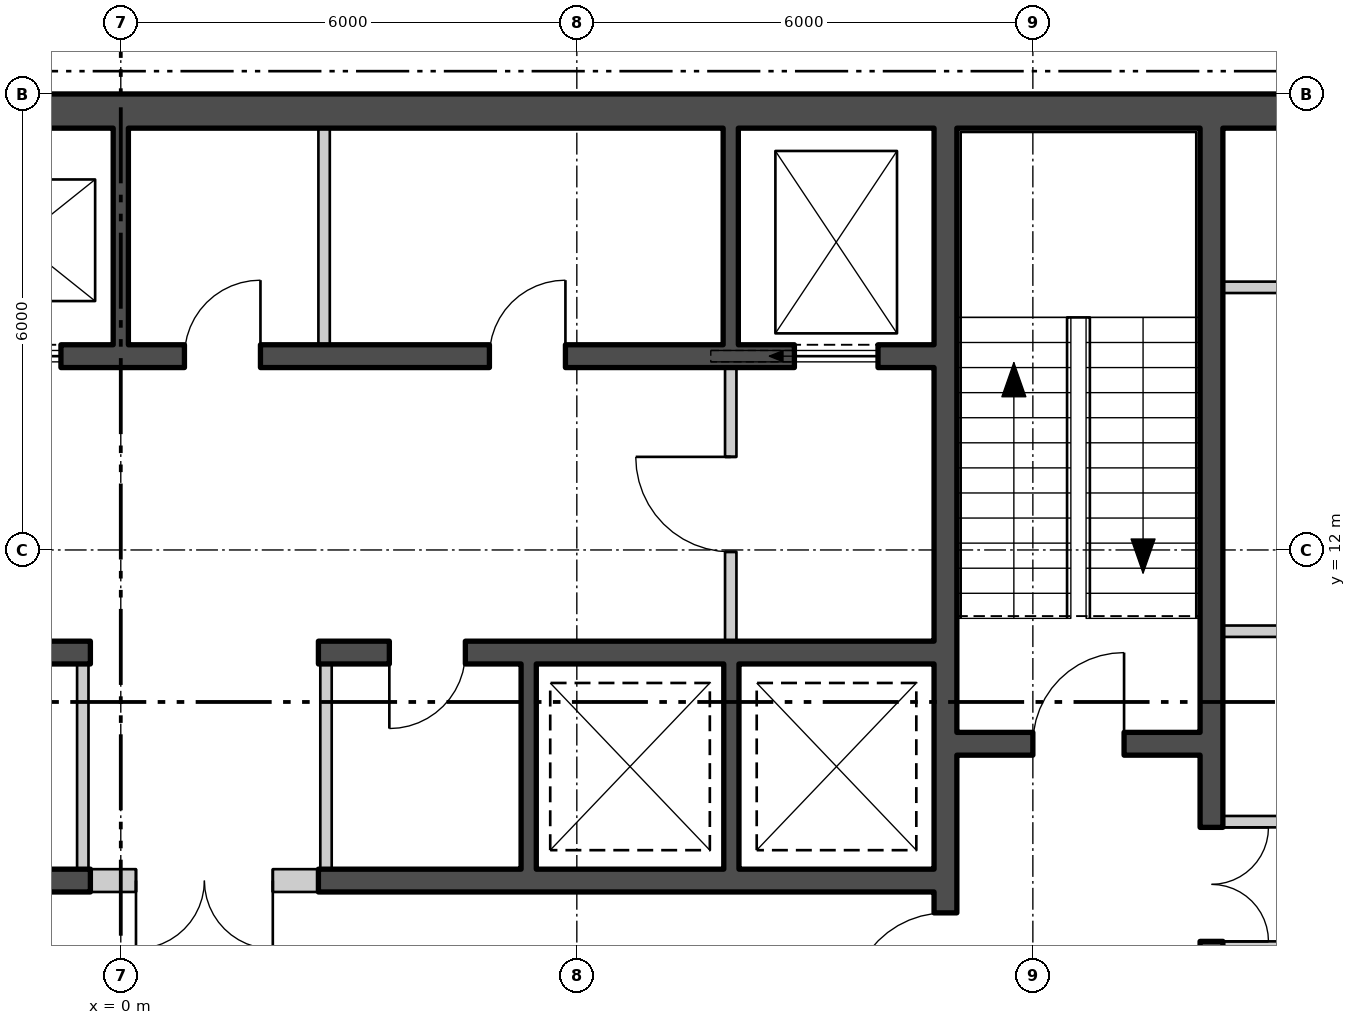
"""IFC4 building model, lengths in metres.
Left out: names, types, materials, properties, quantities, classifications, styles, units other than length and angle.
Written with IfcOpenShell. Run it as: python <this file> out.ifc"""

import sys

from ifc_helpers import new_model, si_unit, direction, frame, frame_2d, origin, place, context, subcontext, project, spatial, polyline, rectangle, outline, extrude, element, fill, save


model = new_model("IFC4")
c1 = context("Model", 3, precision=1e-05, world=origin(), true_north=direction((0.0, 1.0)))
c2 = subcontext(c1, "Body", "Model", "MODEL_VIEW")
j1 = project(units=[si_unit("LENGTHUNIT", "METRE"), si_unit("PLANEANGLEUNIT", "RADIAN")], contexts=[c1])
p1 = place(None, origin())
s1 = spatial("IfcSite", under=j1, at=p1, CompositionType="ELEMENT")
p2 = place(p1, origin())
s2 = spatial("IfcBuilding", under=s1, at=p2, CompositionType="ELEMENT")
p3 = place(p2, frame((0.0, 0.0, 204.3)))
s3 = spatial("IfcBuildingStorey", under=s2, at=p3, CompositionType="ELEMENT", Elevation=204.3)
p4 = place(p3, frame((3.515, -25.726, -0.18), z_axis=(0.0, 0.0, 1.0), x_axis=(0.499999764979, 0.866025539474, 0.0)))
e1 = element("IfcWall", 1, at=p4, inside=s3, PredefinedType="SOLIDWALL", context=c2, shape_type="SweptSolid", body=[
    extrude(outline(polyline([(-0.13, -0.225), (45.87, -0.225), (45.61, 0.225), (0.13, 0.225), (-0.13, -0.225)])), origin(), (0.0, 0.0, 1.0), 3.68),
])
p5 = place(p4, frame((1.424, 0.0, 1.08)))
e2 = element("IfcOpeningElement", 2, at=p5, cuts=e1, PredefinedType="OPENING", context=c2, shape_type="SweptSolid", body=[
    extrude(rectangle(XDim=2.4, YDim=2.0, at=frame_2d((1.2, 1.0))), frame((0.0, 0.235, 0.0), z_axis=(0.0, -1.0, 0.0), x_axis=(1.0, 0.0, 0.0)), (0.0, 0.0, 1.0), 0.47),
])
p6 = place(p4, frame((5.893, 0.0, 1.08)))
e3 = element("IfcOpeningElement", 3, at=p6, cuts=e1, PredefinedType="OPENING", context=c2, shape_type="SweptSolid", body=[
    extrude(rectangle(XDim=2.4, YDim=2.0, at=frame_2d((1.2, 1.0))), frame((0.0, 0.235, 0.0), z_axis=(0.0, -1.0, 0.0), x_axis=(1.0, 0.0, 0.0)), (0.0, 0.0, 1.0), 0.47),
])
p7 = place(p4, frame((10.401, 0.0, 1.08)))
e4 = element("IfcOpeningElement", 4, at=p7, cuts=e1, PredefinedType="OPENING", context=c2, shape_type="SweptSolid", body=[
    extrude(rectangle(XDim=2.4, YDim=2.0, at=frame_2d((1.2, 1.0))), frame((0.0, 0.235, 0.0), z_axis=(0.0, -1.0, 0.0), x_axis=(1.0, 0.0, 0.0)), (0.0, 0.0, 1.0), 0.47),
])
p8 = place(p4, frame((14.909, 0.0, 1.08)))
e5 = element("IfcOpeningElement", 5, at=p8, cuts=e1, PredefinedType="OPENING", context=c2, shape_type="SweptSolid", body=[
    extrude(rectangle(XDim=2.4, YDim=2.0, at=frame_2d((1.2, 1.0))), frame((0.0, 0.235, 0.0), z_axis=(0.0, -1.0, 0.0), x_axis=(1.0, 0.0, 0.0)), (0.0, 0.0, 1.0), 0.47),
])
p9 = place(p4, frame((19.416, 0.0, 1.08)))
e6 = element("IfcOpeningElement", 6, at=p9, cuts=e1, PredefinedType="OPENING", context=c2, shape_type="SweptSolid", body=[
    extrude(rectangle(XDim=2.4, YDim=2.0, at=frame_2d((1.2, 1.0))), frame((0.0, 0.235, 0.0), z_axis=(0.0, -1.0, 0.0), x_axis=(1.0, 0.0, 0.0)), (0.0, 0.0, 1.0), 0.47),
])
p10 = place(p4, frame((23.924, 0.0, 1.08)))
e7 = element("IfcOpeningElement", 7, at=p10, cuts=e1, PredefinedType="OPENING", context=c2, shape_type="SweptSolid", body=[
    extrude(rectangle(XDim=2.4, YDim=2.0, at=frame_2d((1.2, 1.0))), frame((0.0, 0.235, 0.0), z_axis=(0.0, -1.0, 0.0), x_axis=(1.0, 0.0, 0.0)), (0.0, 0.0, 1.0), 0.47),
])
p11 = place(p4, frame((28.431, 0.0, 1.08)))
e8 = element("IfcOpeningElement", 8, at=p11, cuts=e1, PredefinedType="OPENING", context=c2, shape_type="SweptSolid", body=[
    extrude(rectangle(XDim=2.4, YDim=2.0, at=frame_2d((1.2, 1.0))), frame((0.0, 0.235, 0.0), z_axis=(0.0, -1.0, 0.0), x_axis=(1.0, 0.0, 0.0)), (0.0, 0.0, 1.0), 0.47),
])
p12 = place(p4, frame((32.939, 0.0, 1.08)))
e9 = element("IfcOpeningElement", 9, at=p12, cuts=e1, PredefinedType="OPENING", context=c2, shape_type="SweptSolid", body=[
    extrude(rectangle(XDim=2.4, YDim=2.0, at=frame_2d((1.2, 1.0))), frame((0.0, 0.235, 0.0), z_axis=(0.0, -1.0, 0.0), x_axis=(1.0, 0.0, 0.0)), (0.0, 0.0, 1.0), 0.47),
])
p13 = place(p4, frame((37.447, 0.0, 1.08)))
e10 = element("IfcOpeningElement", 10, at=p13, cuts=e1, PredefinedType="OPENING", context=c2, shape_type="SweptSolid", body=[
    extrude(rectangle(XDim=2.4, YDim=2.0, at=frame_2d((1.2, 1.0))), frame((0.0, 0.235, 0.0), z_axis=(0.0, -1.0, 0.0), x_axis=(1.0, 0.0, 0.0)), (0.0, 0.0, 1.0), 0.47),
])
p14 = place(p4, frame((41.916, 0.0, 1.08)))
e11 = element("IfcOpeningElement", 11, at=p14, cuts=e1, PredefinedType="OPENING", context=c2, shape_type="SweptSolid", body=[
    extrude(rectangle(XDim=2.4, YDim=2.0, at=frame_2d((1.2, 1.0))), frame((0.0, 0.235, 0.0), z_axis=(0.0, -1.0, 0.0), x_axis=(1.0, 0.0, 0.0)), (0.0, 0.0, 1.0), 0.47),
])
p15 = place(p3, frame((-16.2, 17.775, 0.0), z_axis=(0.0, 0.0, 1.0), x_axis=(1.0, 0.0, 0.0)))
e12 = element("IfcWall", 12, at=p15, inside=s3, PredefinedType="SHEAR", context=c2, shape_type="SweptSolid", body=[
    extrude(rectangle(XDim=32.4, YDim=0.45, at=frame_2d((16.2, 0.0))), origin(), (0.0, 0.0, 1.0), 3.7),
])
p16 = place(p3, frame((10.85, 2.45, 0.0), z_axis=(0.0, 0.0, 1.0), x_axis=(0.0, 1.0, 0.0)))
e13 = element("IfcWall", 13, at=p16, inside=s3, PredefinedType="SHEAR", context=c2, shape_type="SweptSolid", body=[
    extrude(rectangle(XDim=15.1, YDim=0.3, at=frame_2d((7.55, 0.0))), origin(), (0.0, 0.0, 1.0), 3.7),
])
p17 = place(p16, frame((3.525, 0.0, 0.0)))
e14 = element("IfcOpeningElement", 14, at=p17, cuts=e13, PredefinedType="OPENING", context=c2, shape_type="SweptSolid", body=[
    extrude(rectangle(XDim=1.25, YDim=2.1, at=frame_2d((0.625, 1.05))), frame((0.0, 0.16, 0.0), z_axis=(0.0, -1.0, 0.0), x_axis=(1.0, 0.0, 0.0)), (0.0, 0.0, 1.0), 0.32),
])
p18 = place(p16, frame((1.15, 0.0, 0.0)))
e15 = element("IfcOpeningElement", 15, at=p18, cuts=e13, PredefinedType="OPENING", context=c2, shape_type="SweptSolid", body=[
    extrude(rectangle(XDim=1.0, YDim=2.1, at=frame_2d((0.5, 1.05))), frame((0.0, 0.16, 0.0), z_axis=(0.0, -1.0, 0.0), x_axis=(1.0, 0.0, 0.0)), (0.0, 0.0, 1.0), 0.32),
])
p19 = place(p3, frame((14.35, 2.45, 0.0), z_axis=(0.0, 0.0, 1.0), x_axis=(0.0, 1.0, 0.0)))
e16 = element("IfcWall", 16, at=p19, inside=s3, PredefinedType="SHEAR", context=c2, shape_type="SweptSolid", body=[
    extrude(rectangle(XDim=15.1, YDim=0.3, at=frame_2d((7.55, 0.0))), origin(), (0.0, 0.0, 1.0), 3.7),
])
p20 = place(p19, frame((4.4, 0.0, 0.0)))
e17 = element("IfcOpeningElement", 17, at=p20, cuts=e16, PredefinedType="OPENING", context=c2, shape_type="SweptSolid", body=[
    extrude(rectangle(XDim=1.5, YDim=2.1, at=frame_2d((0.75, 1.05))), frame((0.0, 0.16, 0.0), z_axis=(0.0, -1.0, 0.0), x_axis=(1.0, 0.0, 0.0)), (0.0, 0.0, 1.0), 0.32),
])
p21 = place(p3, frame((11.0, 9.45, 0.0), z_axis=(0.0, 0.0, 1.0), x_axis=(1.0, 0.0, 0.0)))
e18 = element("IfcWall", 18, at=p21, inside=s3, PredefinedType="SHEAR", context=c2, shape_type="SweptSolid", body=[
    extrude(rectangle(XDim=3.2, YDim=0.3, at=frame_2d((1.6, 0.0))), origin(), (0.0, 0.0, 1.0), 3.7),
])
p22 = place(p21, frame((1.0, 0.0, 0.0)))
e19 = element("IfcOpeningElement", 19, at=p22, cuts=e18, PredefinedType="OPENING", context=c2, shape_type="SweptSolid", body=[
    extrude(rectangle(XDim=1.2, YDim=2.1, at=frame_2d((0.6, 1.05))), frame((0.0, 0.16, 0.0), z_axis=(0.0, -1.0, 0.0), x_axis=(1.0, 0.0, 0.0)), (0.0, 0.0, 1.0), 0.32),
])
p23 = place(p3, frame((-10.7, 14.55, 0.0), z_axis=(0.0, 0.0, 1.0), x_axis=(1.0, 0.0, 0.0)))
e20 = element("IfcWall", 20, at=p23, inside=s3, PredefinedType="SHEAR", context=c2, shape_type="SweptSolid", body=[
    extrude(rectangle(XDim=21.4, YDim=0.3, at=frame_2d((10.7, 0.0))), origin(), (0.0, 0.0, 1.0), 3.7),
])
p24 = place(p23, frame((0.738, 0.0, 0.0)))
e21 = element("IfcOpeningElement", 21, at=p24, cuts=e20, PredefinedType="OPENING", context=c2, shape_type="SweptSolid", body=[
    extrude(rectangle(XDim=1.1, YDim=2.1, at=frame_2d((0.55, 1.05))), frame((0.0, 0.16, 0.0), z_axis=(0.0, -1.0, 0.0), x_axis=(1.0, 0.0, 0.0)), (0.0, 0.0, 1.0), 0.32),
])
p25 = place(p23, frame((3.462, 0.0, 0.0)))
e22 = element("IfcOpeningElement", 22, at=p25, cuts=e20, PredefinedType="OPENING", context=c2, shape_type="SweptSolid", body=[
    extrude(rectangle(XDim=1.1, YDim=2.1, at=frame_2d((0.55, 1.05))), frame((0.0, 0.16, 0.0), z_axis=(0.0, -1.0, 0.0), x_axis=(1.0, 0.0, 0.0)), (0.0, 0.0, 1.0), 0.32),
])
p26 = place(p23, frame((6.138, 0.0, 0.0)))
e23 = element("IfcOpeningElement", 23, at=p26, cuts=e20, PredefinedType="OPENING", context=c2, shape_type="SweptSolid", body=[
    extrude(rectangle(XDim=1.1, YDim=2.1, at=frame_2d((0.55, 1.05))), frame((0.0, 0.16, 0.0), z_axis=(0.0, -1.0, 0.0), x_axis=(1.0, 0.0, 0.0)), (0.0, 0.0, 1.0), 0.32),
])
p27 = place(p23, frame((8.812, 0.0, 0.0)))
e24 = element("IfcOpeningElement", 24, at=p27, cuts=e20, PredefinedType="OPENING", context=c2, shape_type="SweptSolid", body=[
    extrude(rectangle(XDim=1.1, YDim=2.1, at=frame_2d((0.55, 1.05))), frame((0.0, 0.16, 0.0), z_axis=(0.0, -1.0, 0.0), x_axis=(1.0, 0.0, 0.0)), (0.0, 0.0, 1.0), 0.32),
])
p28 = place(p23, frame((19.562, 0.0, 0.0)))
e25 = element("IfcOpeningElement", 25, at=p28, cuts=e20, PredefinedType="OPENING", context=c2, shape_type="SweptSolid", body=[
    extrude(rectangle(XDim=1.1, YDim=2.1, at=frame_2d((0.55, 1.05))), frame((0.0, 0.16, 0.0), z_axis=(0.0, -1.0, 0.0), x_axis=(1.0, 0.0, 0.0)), (0.0, 0.0, 1.0), 0.32),
])
p29 = place(p23, frame((11.537, 0.0, 0.0)))
e26 = element("IfcOpeningElement", 26, at=p29, cuts=e20, PredefinedType="OPENING", context=c2, shape_type="SweptSolid", body=[
    extrude(rectangle(XDim=1.0, YDim=2.1, at=frame_2d((0.5, 1.05))), frame((0.0, 0.16, 0.0), z_axis=(0.0, -1.0, 0.0), x_axis=(1.0, 0.0, 0.0)), (0.0, 0.0, 1.0), 0.32),
])
p30 = place(p23, frame((15.55, 0.0, 0.0)))
e27 = element("IfcOpeningElement", 27, at=p30, cuts=e20, PredefinedType="OPENING", context=c2, shape_type="SweptSolid", body=[
    extrude(rectangle(XDim=1.0, YDim=2.1, at=frame_2d((0.5, 1.05))), frame((0.0, 0.16, 0.0), z_axis=(0.0, -1.0, 0.0), x_axis=(1.0, 0.0, 0.0)), (0.0, 0.0, 1.0), 0.32),
])
p31 = place(p3, frame((-10.7, 10.65, 0.0), z_axis=(0.0, 0.0, 1.0), x_axis=(1.0, 0.0, 0.0)))
e28 = element("IfcWall", 28, at=p31, inside=s3, PredefinedType="SHEAR", context=c2, shape_type="SweptSolid", body=[
    extrude(rectangle(XDim=10.3, YDim=0.3, at=frame_2d((5.15, 0.0))), origin(), (0.0, 0.0, 1.0), 3.7),
])
p32 = place(p31, frame((0.675, 0.0, 0.0)))
e29 = element("IfcOpeningElement", 29, at=p32, cuts=e28, PredefinedType="OPENING", context=c2, shape_type="SweptSolid", body=[
    extrude(rectangle(XDim=1.1, YDim=2.1, at=frame_2d((0.55, 1.05))), frame((0.0, 0.16, 0.0), z_axis=(0.0, -1.0, 0.0), x_axis=(1.0, 0.0, 0.0)), (0.0, 0.0, 1.0), 0.32),
])
p33 = place(p31, frame((3.275, 0.0, 0.0)))
e30 = element("IfcOpeningElement", 30, at=p33, cuts=e28, PredefinedType="OPENING", context=c2, shape_type="SweptSolid", body=[
    extrude(rectangle(XDim=1.1, YDim=2.1, at=frame_2d((0.55, 1.05))), frame((0.0, 0.16, 0.0), z_axis=(0.0, -1.0, 0.0), x_axis=(1.0, 0.0, 0.0)), (0.0, 0.0, 1.0), 0.32),
])
p34 = place(p31, frame((5.825, 0.0, 0.0)))
e31 = element("IfcOpeningElement", 31, at=p34, cuts=e28, PredefinedType="OPENING", context=c2, shape_type="SweptSolid", body=[
    extrude(rectangle(XDim=1.1, YDim=2.1, at=frame_2d((0.55, 1.05))), frame((0.0, 0.16, 0.0), z_axis=(0.0, -1.0, 0.0), x_axis=(1.0, 0.0, 0.0)), (0.0, 0.0, 1.0), 0.32),
])
p35 = place(p31, frame((8.425, 0.0, 0.0)))
e32 = element("IfcOpeningElement", 32, at=p35, cuts=e28, PredefinedType="OPENING", context=c2, shape_type="SweptSolid", body=[
    extrude(rectangle(XDim=1.0, YDim=2.1, at=frame_2d((0.5, 1.05))), frame((0.0, 0.16, 0.0), z_axis=(0.0, -1.0, 0.0), x_axis=(1.0, 0.0, 0.0)), (0.0, 0.0, 1.0), 0.32),
])
p36 = place(p3, frame((-10.7, 7.65, 0.0), z_axis=(0.0, 0.0, 1.0), x_axis=(1.0, 0.0, 0.0)))
e33 = element("IfcWall", 33, at=p36, inside=s3, PredefinedType="SHEAR", context=c2, shape_type="SweptSolid", body=[
    extrude(rectangle(XDim=10.3, YDim=0.3, at=frame_2d((5.15, 0.0))), origin(), (0.0, 0.0, 1.0), 3.7),
])
p37 = place(p3, frame((2.6, 10.65, 0.0), z_axis=(0.0, 0.0, 1.0), x_axis=(1.0, 0.0, 0.0)))
e34 = element("IfcWall", 34, at=p37, inside=s3, PredefinedType="SHEAR", context=c2, shape_type="SweptSolid", body=[
    extrude(rectangle(XDim=8.1, YDim=0.3, at=frame_2d((4.05, 0.0))), origin(), (0.0, 0.0, 1.0), 3.7),
])
p38 = place(p37, frame((0.933, 0.0, 0.0)))
e35 = element("IfcOpeningElement", 35, at=p38, cuts=e34, PredefinedType="OPENING", context=c2, shape_type="SweptSolid", body=[
    extrude(rectangle(XDim=1.0, YDim=2.1, at=frame_2d((0.5, 1.05))), frame((0.0, 0.16, 0.0), z_axis=(0.0, -1.0, 0.0), x_axis=(1.0, 0.0, 0.0)), (0.0, 0.0, 1.0), 0.32),
])
p39 = place(p3, frame((2.6, 7.65, 0.0), z_axis=(0.0, 0.0, 1.0), x_axis=(1.0, 0.0, 0.0)))
e36 = element("IfcWall", 36, at=p39, inside=s3, PredefinedType="SHEAR", context=c2, shape_type="SweptSolid", body=[
    extrude(rectangle(XDim=8.1, YDim=0.3, at=frame_2d((4.05, 0.0))), origin(), (0.0, 0.0, 1.0), 3.7),
])
p40 = place(p3, frame((0.0, 14.7, 0.0), z_axis=(0.0, 0.0, 1.0), x_axis=(0.0, 1.0, 0.0)))
e37 = element("IfcWall", 37, at=p40, inside=s3, PredefinedType="SHEAR", context=c2, shape_type="SweptSolid", body=[
    extrude(rectangle(XDim=2.85, YDim=0.2, at=frame_2d((1.425, 0.0))), origin(), (0.0, 0.0, 1.0), 3.7),
])
p41 = place(p3, frame((2.675, 14.7, 0.0), z_axis=(0.0, 0.0, 1.0), x_axis=(0.0, 1.0, 0.0)))
e38 = element("IfcWall", 38, at=p41, inside=s3, PredefinedType="PARTITIONING", context=c2, shape_type="SweptSolid", body=[
    extrude(rectangle(XDim=2.85, YDim=0.15, at=frame_2d((1.425, 0.0))), origin(), (0.0, 0.0, 1.0), 3.7),
])
p42 = place(p3, frame((8.025, 14.7, 0.0), z_axis=(0.0, 0.0, 1.0), x_axis=(0.0, 1.0, 0.0)))
e39 = element("IfcWall", 39, at=p42, inside=s3, PredefinedType="SHEAR", context=c2, shape_type="SweptSolid", body=[
    extrude(rectangle(XDim=2.85, YDim=0.2, at=frame_2d((1.425, 0.0))), origin(), (0.0, 0.0, 1.0), 3.7),
])
for number, where, z_axis, x_axis in (
    (40, (-0.5, 7.8, 0.0), (0.0, 0.0, 1.0), (0.0, 1.0, 0.0)),
    (41, (2.7, 7.8, 0.0), (0.0, 0.0, 1.0), (0.0, 1.0, 0.0)),
):
    element("IfcWall", number, at=place(p3, frame(where, z_axis=z_axis, x_axis=x_axis)), inside=s3, PredefinedType="PARTITIONING", context=c2, shape_type="SweptSolid", body=[
        extrude(rectangle(XDim=2.7, YDim=0.15, at=frame_2d((1.35, 0.0))), origin(), (0.0, 0.0, 1.0), 3.7),
    ])
for number, where, z_axis, x_axis in (
    (42, (5.367, 7.8, 0.0), (0.0, 0.0, 1.0), (0.0, 1.0, 0.0)),
    (43, (8.033, 7.8, 0.0), (0.0, 0.0, 1.0), (0.0, 1.0, 0.0)),
):
    element("IfcWall", number, at=place(p3, frame(where, z_axis=z_axis, x_axis=x_axis)), inside=s3, PredefinedType="SHEAR", context=c2, shape_type="SweptSolid", body=[
        extrude(rectangle(XDim=2.7, YDim=0.2, at=frame_2d((1.35, 0.0))), origin(), (0.0, 0.0, 1.0), 3.7),
    ])
p43 = place(p3, frame((8.025, 10.8, 0.0), z_axis=(0.0, 0.0, 1.0), x_axis=(0.0, 1.0, 0.0)))
e44 = element("IfcWall", 44, at=p43, inside=s3, PredefinedType="PARTITIONING", context=c2, shape_type="SweptSolid", body=[
    extrude(rectangle(XDim=3.6, YDim=0.15, at=frame_2d((1.8, 0.0))), origin(), (0.0, 0.0, 1.0), 3.7),
])
p44 = place(p43, frame((1.175, 0.0, 0.0)))
e45 = element("IfcOpeningElement", 45, at=p44, cuts=e44, PredefinedType="OPENING", context=c2, shape_type="SweptSolid", body=[
    extrude(rectangle(XDim=1.25, YDim=2.1, at=frame_2d((0.625, 1.05))), frame((0.0, 0.085, 0.0), z_axis=(0.0, -1.0, 0.0), x_axis=(1.0, 0.0, 0.0)), (0.0, 0.0, 1.0), 0.17),
])
for number, where, z_axis, x_axis in (
    (46, (14.5, 6.775, 0.0), (0.0, 0.0, 1.0), (1.0, 0.0, 0.0)),
    (47, (14.5, 8.425, 0.0), (0.0, 0.0, 1.0), (1.0, 0.0, 0.0)),
    (48, (14.5, 10.931, 0.0), (0.0, 0.0, 1.0), (1.0, 0.0, 0.0)),
    (49, (14.5, 15.456, 0.0), (0.0, 0.0, 1.0), (1.0, 0.0, 0.0)),
):
    element("IfcWall", number, at=place(p3, frame(where, z_axis=z_axis, x_axis=x_axis)), inside=s3, PredefinedType="PARTITIONING", context=c2, shape_type="SweptSolid", body=[
        extrude(rectangle(XDim=1.25, YDim=0.15, at=frame_2d((0.625, 0.0))), origin(), (0.0, 0.0, 1.0), 3.7),
    ])
p45 = place(p3, frame((-0.4, 7.65, 0.0), z_axis=(0.0, 0.0, 1.0), x_axis=(1.0, 0.0, 0.0)))
e50 = element("IfcWall", 50, at=p45, inside=s3, PredefinedType="PARTITIONING", context=c2, shape_type="SweptSolid", body=[
    extrude(rectangle(XDim=3.0, YDim=0.3, at=frame_2d((1.5, 0.0))), origin(), (0.0, 0.0, 1.0), 3.7),
])
p46 = place(p45, frame((0.6, 0.0, 0.0)))
e51 = element("IfcOpeningElement", 51, at=p46, cuts=e50, PredefinedType="OPENING", context=c2, shape_type="SweptSolid", body=[
    extrude(rectangle(XDim=1.8, YDim=2.4, at=frame_2d((0.9, 1.2))), frame((0.0, 0.16, 0.0), z_axis=(0.0, -1.0, 0.0), x_axis=(1.0, 0.0, 0.0)), (0.0, 0.0, 1.0), 0.32),
])
p47 = place(p27, origin())
e52 = element("IfcDoor", 52, at=p47, inside=s3, OperationType="SLIDING_TO_LEFT", PredefinedType="DOOR", context=c2, shape_type="SweptSolid", body=[
    extrude(rectangle(XDim=1.1, YDim=2.1, at=frame_2d((0.55, 1.05))), frame((0.0, 0.025, 0.0), z_axis=(0.0, -1.0, 0.0), x_axis=(1.0, 0.0, 0.0)), (0.0, 0.0, 1.0), 0.05),
])
fill(e24, e52)
p48 = place(p28, origin())
e53 = element("IfcDoor", 53, at=p48, inside=s3, OperationType="SLIDING_TO_LEFT", PredefinedType="DOOR", context=c2, shape_type="SweptSolid", body=[
    extrude(rectangle(XDim=1.1, YDim=2.1, at=frame_2d((0.55, 1.05))), frame((0.0, 0.025, 0.0), z_axis=(0.0, -1.0, 0.0), x_axis=(1.0, 0.0, 0.0)), (0.0, 0.0, 1.0), 0.05),
])
fill(e25, e53)
p49 = place(p29, origin())
e54 = element("IfcDoor", 54, at=p49, inside=s3, OperationType="SINGLE_SWING_LEFT", PredefinedType="DOOR", context=c2, shape_type="SweptSolid", body=[
    extrude(rectangle(XDim=1.0, YDim=2.1, at=frame_2d((0.5, 1.05))), frame((0.0, 0.025, 0.0), z_axis=(0.0, -1.0, 0.0), x_axis=(1.0, 0.0, 0.0)), (0.0, 0.0, 1.0), 0.05),
])
fill(e26, e54)
p50 = place(p30, origin())
e55 = element("IfcDoor", 55, at=p50, inside=s3, OperationType="SINGLE_SWING_LEFT", PredefinedType="DOOR", context=c2, shape_type="SweptSolid", body=[
    extrude(rectangle(XDim=1.0, YDim=2.1, at=frame_2d((0.5, 1.05))), frame((0.0, 0.025, 0.0), z_axis=(0.0, -1.0, 0.0), x_axis=(1.0, 0.0, 0.0)), (0.0, 0.0, 1.0), 0.05),
])
fill(e27, e55)
p51 = place(p38, origin())
e56 = element("IfcDoor", 56, at=p51, inside=s3, OperationType="SINGLE_SWING_LEFT", PredefinedType="DOOR", context=c2, shape_type="SweptSolid", body=[
    extrude(rectangle(XDim=1.0, YDim=2.1, at=frame_2d((0.5, 1.05))), frame((0.0, 0.025, 0.0), z_axis=(0.0, -1.0, 0.0), x_axis=(1.0, 0.0, 0.0)), (0.0, 0.0, 1.0), 0.05),
])
fill(e35, e56)
p52 = place(p44, origin())
e57 = element("IfcDoor", 57, at=p52, inside=s3, OperationType="SINGLE_SWING_LEFT", PredefinedType="DOOR", context=c2, shape_type="SweptSolid", body=[
    extrude(rectangle(XDim=1.25, YDim=2.1, at=frame_2d((0.625, 1.05))), frame((0.0, 0.025, 0.0), z_axis=(0.0, -1.0, 0.0), x_axis=(1.0, 0.0, 0.0)), (0.0, 0.0, 1.0), 0.05),
])
fill(e45, e57)
p53 = place(p22, origin())
e58 = element("IfcDoor", 58, at=p53, inside=s3, OperationType="SINGLE_SWING_LEFT", PredefinedType="DOOR", context=c2, shape_type="SweptSolid", body=[
    extrude(rectangle(XDim=1.2, YDim=2.1, at=frame_2d((0.6, 1.05))), frame((0.0, 0.025, 0.0), z_axis=(0.0, -1.0, 0.0), x_axis=(1.0, 0.0, 0.0)), (0.0, 0.0, 1.0), 0.05),
])
fill(e19, e58)
p54 = place(p17, origin())
e59 = element("IfcDoor", 59, at=p54, inside=s3, OperationType="SINGLE_SWING_RIGHT", PredefinedType="DOOR", context=c2, shape_type="SweptSolid", body=[
    extrude(rectangle(XDim=1.25, YDim=2.1, at=frame_2d((0.625, 1.05))), frame((0.0, 0.025, 0.0), z_axis=(0.0, -1.0, 0.0), x_axis=(1.0, 0.0, 0.0)), (0.0, 0.0, 1.0), 0.05),
])
fill(e14, e59)
p55 = place(p20, origin())
e60 = element("IfcDoor", 60, at=p55, inside=s3, OperationType="DOUBLE_DOOR_SINGLE_SWING", PredefinedType="DOOR", context=c2, shape_type="SweptSolid", body=[
    extrude(rectangle(XDim=1.5, YDim=2.1, at=frame_2d((0.75, 1.05))), frame((0.0, 0.025, 0.0), z_axis=(0.0, -1.0, 0.0), x_axis=(1.0, 0.0, 0.0)), (0.0, 0.0, 1.0), 0.05),
])
fill(e17, e60)
p56 = place(p46, origin())
e61 = element("IfcDoor", 61, at=p56, inside=s3, OperationType="DOUBLE_DOOR_SINGLE_SWING", PredefinedType="DOOR", context=c2, shape_type="SweptSolid", body=[
    extrude(rectangle(XDim=1.8, YDim=2.4, at=frame_2d((0.9, 1.2))), frame((0.0, 0.025, 0.0), z_axis=(0.0, -1.0, 0.0), x_axis=(1.0, 0.0, 0.0)), (0.0, 0.0, 1.0), 0.05),
])
fill(e51, e61)
save(model, sys.argv[1])
